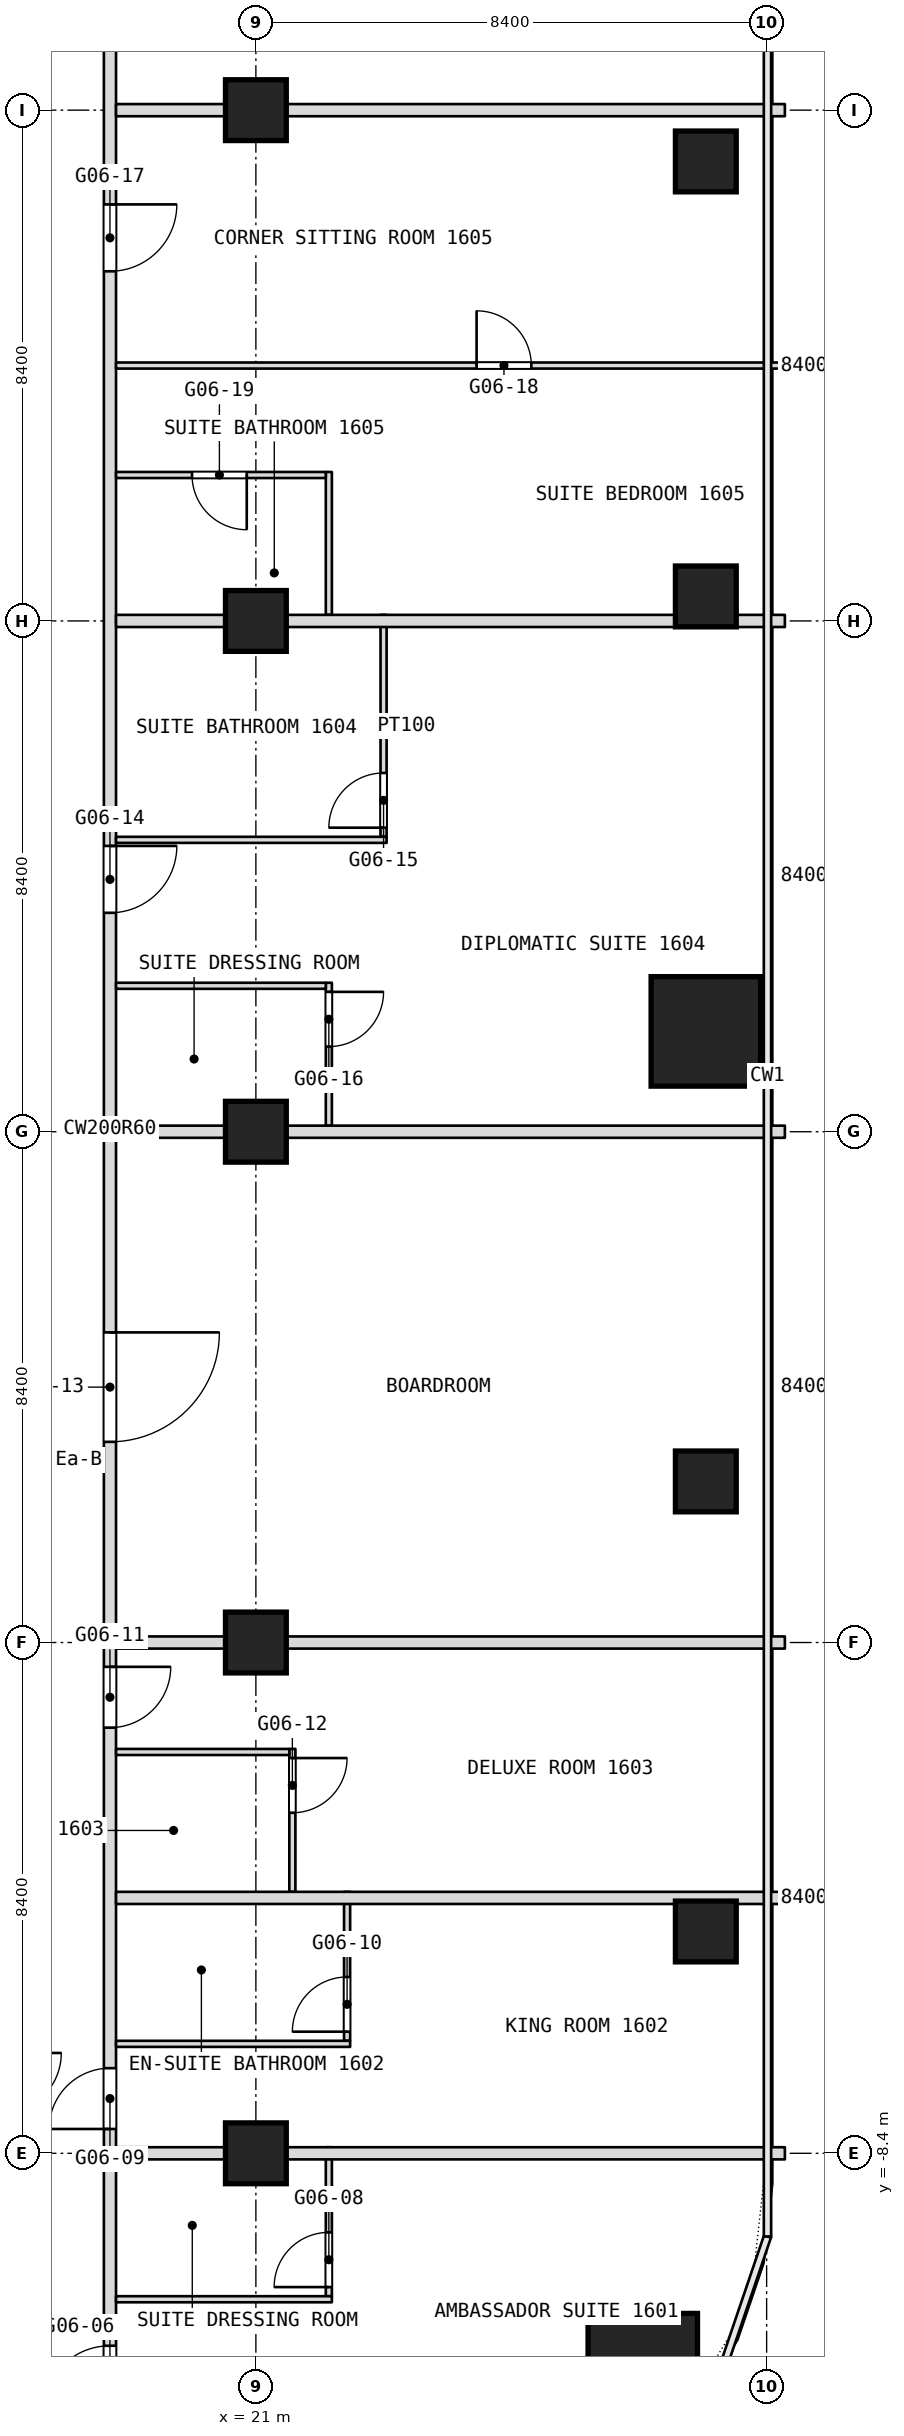
"""IFC4 building model, lengths in metres.
Left out: names, types, materials, properties, quantities, classifications, styles, units other than length and angle.
Written with IfcOpenShell. Run it as: python <this file> out.ifc"""

import sys

from ifc_helpers import new_model, si_unit, direction, frame, frame_2d, origin, origin_2d, place, context, subcontext, project, spatial, rectangle, extrude, element, fill, save


model = new_model("IFC4")
c1 = context("Model", 3, precision=1e-05, world=origin(), true_north=direction((0.0, 1.0)))
c2 = subcontext(c1, "Body", "Model", "MODEL_VIEW")
j1 = project(units=[si_unit("LENGTHUNIT", "METRE"), si_unit("PLANEANGLEUNIT", "RADIAN")], contexts=[c1])
p1 = place(None, origin())
s1 = spatial("IfcSite", under=j1, at=p1, CompositionType="ELEMENT")
p2 = place(p1, origin())
s2 = spatial("IfcBuilding", under=s1, at=p2, CompositionType="ELEMENT")
p3 = place(p2, frame((0.0, 0.0, 72.5)))
s3 = spatial("IfcBuildingStorey", under=s2, at=p3, CompositionType="ELEMENT", Elevation=72.5)
for number, where, z_axis, x_axis in (
    (1, (27.363, -11.933, 0.0), (0.0, 0.0, 1.0), (1.0, 0.0, 0.0)),
    (2, (28.4, 10.05, 0.0), (0.0, 0.0, 1.0), (1.0, 0.0, 0.0)),
):
    element("IfcColumn", number, at=place(p3, frame(where, z_axis=z_axis, x_axis=x_axis)), inside=s3, PredefinedType="COLUMN", context=c2, shape_type="SweptSolid", body=[
        extrude(rectangle(XDim=1.8, YDim=1.8, at=origin_2d()), origin(), (0.0, 0.0, 1.0), 3.6),
    ])
for number, where, z_axis, x_axis in (
    (3, (21.0, -8.4, 0.0), (0.0, 0.0, 1.0), (1.0, 0.0, 0.0)),
    (4, (21.0, 0.0, 0.0), (0.0, 0.0, 1.0), (1.0, 0.0, 0.0)),
    (5, (21.0, 8.4, 0.0), (0.0, 0.0, 1.0), (1.0, 0.0, 0.0)),
    (6, (21.0, 16.8, 0.0), (0.0, 0.0, 1.0), (1.0, 0.0, 0.0)),
    (7, (21.0, 25.2, 0.0), (0.0, 0.0, 1.0), (1.0, 0.0, 0.0)),
    (8, (28.4, 24.356, 0.0), (0.0, 0.0, 1.0), (1.0, 0.0, 0.0)),
    (9, (28.4, 17.203, 0.0), (0.0, 0.0, 1.0), (1.0, 0.0, 0.0)),
    (10, (28.4, 2.649, 0.0), (0.0, 0.0, 1.0), (1.0, 0.0, 0.0)),
    (11, (28.4, -4.752, 0.0), (0.0, 0.0, 1.0), (1.0, 0.0, 0.0)),
):
    element("IfcColumn", number, at=place(p3, frame(where, z_axis=z_axis, x_axis=x_axis)), inside=s3, PredefinedType="COLUMN", context=c2, shape_type="SweptSolid", body=[
        extrude(rectangle(XDim=1.0, YDim=1.0, at=origin_2d()), origin(), (0.0, 0.0, 1.0), 3.6),
    ])
p4 = place(p3, frame((23.1, 13.25, 0.0), z_axis=(0.0, 0.0, 1.0), x_axis=(0.0, 1.0, 0.0)))
e12 = element("IfcWall", 12, at=p4, inside=s3, PredefinedType="PARTITIONING", context=c2, shape_type="SweptSolid", body=[
    extrude(rectangle(XDim=3.65, YDim=0.1, at=frame_2d((1.825, 0.0))), origin(), (0.0, 0.0, 1.0), 3.34),
])
p5 = place(p4, frame((0.15, 0.0, 0.0)))
e13 = element("IfcOpeningElement", 13, at=p5, cuts=e12, PredefinedType="OPENING", context=c2, shape_type="SweptSolid", body=[
    extrude(rectangle(XDim=0.9, YDim=2.1, at=frame_2d((0.45, 1.05))), frame((0.0, 0.05, 0.0), z_axis=(0.0, -1.0, 0.0), x_axis=(1.0, 0.0, 0.0)), (0.0, 0.0, 1.0), 0.1),
])
p6 = place(p3, frame((22.5, -6.55, 0.0), z_axis=(0.0, 0.0, 1.0), x_axis=(0.0, 1.0, 0.0)))
e14 = element("IfcWall", 14, at=p6, inside=s3, PredefinedType="PARTITIONING", context=c2, shape_type="SweptSolid", body=[
    extrude(rectangle(XDim=2.45, YDim=0.1, at=frame_2d((1.225, 0.0))), origin(), (0.0, 0.0, 1.0), 3.34),
])
p7 = place(p6, frame((0.15, 0.0, 0.0)))
e15 = element("IfcOpeningElement", 15, at=p7, cuts=e14, PredefinedType="OPENING", context=c2, shape_type="SweptSolid", body=[
    extrude(rectangle(XDim=0.9, YDim=2.1, at=frame_2d((0.45, 1.05))), frame((0.0, 0.05, 0.0), z_axis=(0.0, -1.0, 0.0), x_axis=(1.0, 0.0, 0.0)), (0.0, 0.0, 1.0), 0.1),
])
p8 = place(p3, frame((22.2, -10.75, 0.0), z_axis=(0.0, 0.0, 1.0), x_axis=(0.0, 1.0, 0.0)))
e16 = element("IfcWall", 16, at=p8, inside=s3, PredefinedType="PARTITIONING", context=c2, shape_type="SweptSolid", body=[
    extrude(rectangle(XDim=2.45, YDim=0.1, at=frame_2d((1.225, 0.0))), origin(), (0.0, 0.0, 1.0), 3.34),
])
p9 = place(p8, frame((0.15, 0.0, 0.0)))
e17 = element("IfcOpeningElement", 17, at=p9, cuts=e16, PredefinedType="OPENING", context=c2, shape_type="SweptSolid", body=[
    extrude(rectangle(XDim=0.9, YDim=2.1, at=frame_2d((0.45, 1.05))), frame((0.0, 0.05, 0.0), z_axis=(0.0, -1.0, 0.0), x_axis=(1.0, 0.0, 0.0)), (0.0, 0.0, 1.0), 0.1),
])
p10 = place(p3, frame((22.2, 8.5, 0.0), z_axis=(0.0, 0.0, 1.0), x_axis=(0.0, 1.0, 0.0)))
e18 = element("IfcWall", 18, at=p10, inside=s3, PredefinedType="PARTITIONING", context=c2, shape_type="SweptSolid", body=[
    extrude(rectangle(XDim=2.35, YDim=0.1, at=frame_2d((1.175, 0.0))), origin(), (0.0, 0.0, 1.0), 3.34),
])
p11 = place(p10, frame((1.3, 0.0, 0.0)))
e19 = element("IfcOpeningElement", 19, at=p11, cuts=e18, PredefinedType="OPENING", context=c2, shape_type="SweptSolid", body=[
    extrude(rectangle(XDim=0.9, YDim=2.1, at=frame_2d((0.45, 1.05))), frame((0.0, 0.05, 0.0), z_axis=(0.0, -1.0, 0.0), x_axis=(1.0, 0.0, 0.0)), (0.0, 0.0, 1.0), 0.1),
])
p12 = place(p3, frame((22.2, 16.9, 0.0), z_axis=(0.0, 0.0, 1.0), x_axis=(0.0, 1.0, 0.0)))
e20 = element("IfcWall", 20, at=p12, inside=s3, PredefinedType="PARTITIONING", context=c2, shape_type="SweptSolid", body=[
    extrude(rectangle(XDim=2.35, YDim=0.1, at=frame_2d((1.175, 0.0))), origin(), (0.0, 0.0, 1.0), 3.34),
])
p13 = place(p3, frame((21.6, -4.1, 0.0), z_axis=(0.0, 0.0, 1.0), x_axis=(0.0, 1.0, 0.0)))
e21 = element("IfcWall", 21, at=p13, inside=s3, PredefinedType="PARTITIONING", context=c2, shape_type="SweptSolid", body=[
    extrude(rectangle(XDim=2.35, YDim=0.1, at=frame_2d((1.175, 0.0))), origin(), (0.0, 0.0, 1.0), 3.34),
])
p14 = place(p13, frame((1.3, 0.0, 0.0)))
e22 = element("IfcOpeningElement", 22, at=p14, cuts=e21, PredefinedType="OPENING", context=c2, shape_type="SweptSolid", body=[
    extrude(rectangle(XDim=0.9, YDim=2.1, at=frame_2d((0.45, 1.05))), frame((0.0, 0.05, 0.0), z_axis=(0.0, -1.0, 0.0), x_axis=(1.0, 0.0, 0.0)), (0.0, 0.0, 1.0), 0.1),
])
p15 = place(p3, frame((18.6, -16.665, 0.0), z_axis=(0.0, 0.0, 1.0), x_axis=(0.0, 1.0, 0.0)))
e23 = element("IfcWall", 23, at=p15, inside=s3, PredefinedType="PARTITIONING", context=c2, shape_type="SweptSolid", body=[
    extrude(rectangle(XDim=50.205, YDim=0.2, at=frame_2d((25.103, 0.0))), origin(), (0.0, 0.0, 1.0), 3.34),
])
p16 = place(p15, frame((4.0, 0.0, 0.0)))
e24 = element("IfcOpeningElement", 24, at=p16, cuts=e23, PredefinedType="OPENING", context=c2, shape_type="SweptSolid", body=[
    extrude(rectangle(XDim=1.1, YDim=2.1, at=frame_2d((0.55, 1.05))), frame((0.0, 0.1, 0.0), z_axis=(0.0, -1.0, 0.0), x_axis=(1.0, 0.0, 0.0)), (0.0, 0.0, 1.0), 0.2),
])
p17 = place(p15, frame((8.665, 0.0, 0.0)))
e25 = element("IfcOpeningElement", 25, at=p17, cuts=e23, PredefinedType="OPENING", context=c2, shape_type="SweptSolid", body=[
    extrude(rectangle(XDim=1.0, YDim=2.1, at=frame_2d((0.5, 1.05))), frame((0.0, 0.1, 0.0), z_axis=(0.0, -1.0, 0.0), x_axis=(1.0, 0.0, 0.0)), (0.0, 0.0, 1.0), 0.2),
])
p18 = place(p15, frame((15.265, 0.0, 0.0)))
e26 = element("IfcOpeningElement", 26, at=p18, cuts=e23, PredefinedType="OPENING", context=c2, shape_type="SweptSolid", body=[
    extrude(rectangle(XDim=1.0, YDim=2.1, at=frame_2d((0.5, 1.05))), frame((0.0, 0.1, 0.0), z_axis=(0.0, -1.0, 0.0), x_axis=(1.0, 0.0, 0.0)), (0.0, 0.0, 1.0), 0.2),
])
p19 = place(p15, frame((19.965, 0.0, 0.0)))
e27 = element("IfcOpeningElement", 27, at=p19, cuts=e23, PredefinedType="OPENING", context=c2, shape_type="SweptSolid", body=[
    extrude(rectangle(XDim=1.8, YDim=2.1, at=frame_2d((0.9, 1.05))), frame((0.0, 0.1, 0.0), z_axis=(0.0, -1.0, 0.0), x_axis=(1.0, 0.0, 0.0)), (0.0, 0.0, 1.0), 0.2),
])
p20 = place(p15, frame((28.665, 0.0, 0.0)))
e28 = element("IfcOpeningElement", 28, at=p20, cuts=e23, PredefinedType="OPENING", context=c2, shape_type="SweptSolid", body=[
    extrude(rectangle(XDim=1.1, YDim=2.1, at=frame_2d((0.55, 1.05))), frame((0.0, 0.1, 0.0), z_axis=(0.0, -1.0, 0.0), x_axis=(1.0, 0.0, 0.0)), (0.0, 0.0, 1.0), 0.2),
])
p21 = place(p15, frame((39.215, 0.0, 0.0)))
e29 = element("IfcOpeningElement", 29, at=p21, cuts=e23, PredefinedType="OPENING", context=c2, shape_type="SweptSolid", body=[
    extrude(rectangle(XDim=1.1, YDim=2.1, at=frame_2d((0.55, 1.05))), frame((0.0, 0.1, 0.0), z_axis=(0.0, -1.0, 0.0), x_axis=(1.0, 0.0, 0.0)), (0.0, 0.0, 1.0), 0.2),
])
p22 = place(p15, frame((45.165, 0.0, 0.0)))
e30 = element("IfcOpeningElement", 30, at=p22, cuts=e23, PredefinedType="OPENING", context=c2, shape_type="SweptSolid", body=[
    extrude(rectangle(XDim=1.8, YDim=2.1, at=frame_2d((0.9, 1.05))), frame((0.0, 0.1, 0.0), z_axis=(0.0, -1.0, 0.0), x_axis=(1.0, 0.0, 0.0)), (0.0, 0.0, 1.0), 0.2),
])
p23 = place(p3, frame((18.7, -10.8, 0.0), z_axis=(0.0, 0.0, 1.0), x_axis=(1.0, 0.0, 0.0)))
e31 = element("IfcWall", 31, at=p23, inside=s3, PredefinedType="PARTITIONING", context=c2, shape_type="SweptSolid", body=[
    extrude(rectangle(XDim=3.55, YDim=0.1, at=frame_2d((1.775, 0.0))), origin(), (0.0, 0.0, 1.0), 3.34),
])
p24 = place(p3, frame((18.7, -8.4, 0.0), z_axis=(0.0, 0.0, 1.0), x_axis=(1.0, 0.0, 0.0)))
e32 = element("IfcWall", 32, at=p24, inside=s3, PredefinedType="PARTITIONING", context=c2, shape_type="SweptSolid", body=[
    extrude(rectangle(XDim=11.0, YDim=0.2, at=frame_2d((5.5, 0.0))), origin(), (0.0, 0.0, 1.0), 2.84),
])
p25 = place(p3, frame((18.7, -6.6, 0.0), z_axis=(0.0, 0.0, 1.0), x_axis=(1.0, 0.0, 0.0)))
e33 = element("IfcWall", 33, at=p25, inside=s3, PredefinedType="PARTITIONING", context=c2, shape_type="SweptSolid", body=[
    extrude(rectangle(XDim=3.85, YDim=0.1, at=frame_2d((1.925, 0.0))), origin(), (0.0, 0.0, 1.0), 3.34),
])
p26 = place(p3, frame((18.7, -4.2, 0.0), z_axis=(0.0, 0.0, 1.0), x_axis=(1.0, 0.0, 0.0)))
e34 = element("IfcWall", 34, at=p26, inside=s3, PredefinedType="PARTITIONING", context=c2, shape_type="SweptSolid", body=[
    extrude(rectangle(XDim=11.0, YDim=0.2, at=frame_2d((5.5, 0.0))), origin(), (0.0, 0.0, 1.0), 3.34),
])
p27 = place(p3, frame((18.7, -1.8, 0.0), z_axis=(0.0, 0.0, 1.0), x_axis=(1.0, 0.0, 0.0)))
e35 = element("IfcWall", 35, at=p27, inside=s3, PredefinedType="PARTITIONING", context=c2, shape_type="SweptSolid", body=[
    extrude(rectangle(XDim=2.85, YDim=0.1, at=frame_2d((1.425, 0.0))), origin(), (0.0, 0.0, 1.0), 3.34),
])
for number, where, z_axis, x_axis in (
    (36, (18.7, 0.0, 0.0), (0.0, 0.0, 1.0), (1.0, 0.0, 0.0)),
    (37, (18.7, 8.4, 0.0), (0.0, 0.0, 1.0), (1.0, 0.0, 0.0)),
):
    element("IfcWall", number, at=place(p3, frame(where, z_axis=z_axis, x_axis=x_axis)), inside=s3, PredefinedType="PARTITIONING", context=c2, shape_type="SweptSolid", body=[
        extrude(rectangle(XDim=11.0, YDim=0.2, at=frame_2d((5.5, 0.0))), origin(), (0.0, 0.0, 1.0), 2.84),
    ])
p28 = place(p3, frame((18.7, 10.8, 0.0), z_axis=(0.0, 0.0, 1.0), x_axis=(1.0, 0.0, 0.0)))
e38 = element("IfcWall", 38, at=p28, inside=s3, PredefinedType="PARTITIONING", context=c2, shape_type="SweptSolid", body=[
    extrude(rectangle(XDim=3.45, YDim=0.1, at=frame_2d((1.725, 0.0))), origin(), (0.0, 0.0, 1.0), 3.34),
])
p29 = place(p3, frame((18.7, 13.2, 0.0), z_axis=(0.0, 0.0, 1.0), x_axis=(1.0, 0.0, 0.0)))
e39 = element("IfcWall", 39, at=p29, inside=s3, PredefinedType="PARTITIONING", context=c2, shape_type="SweptSolid", body=[
    extrude(rectangle(XDim=4.45, YDim=0.1, at=frame_2d((2.225, 0.0))), origin(), (0.0, 0.0, 1.0), 3.34),
])
p30 = place(p3, frame((18.7, 16.8, 0.0), z_axis=(0.0, 0.0, 1.0), x_axis=(1.0, 0.0, 0.0)))
e40 = element("IfcWall", 40, at=p30, inside=s3, PredefinedType="PARTITIONING", context=c2, shape_type="SweptSolid", body=[
    extrude(rectangle(XDim=11.0, YDim=0.2, at=frame_2d((5.5, 0.0))), origin(), (0.0, 0.0, 1.0), 2.84),
])
p31 = place(p3, frame((18.7, 19.2, 0.0), z_axis=(0.0, 0.0, 1.0), x_axis=(1.0, 0.0, 0.0)))
e41 = element("IfcWall", 41, at=p31, inside=s3, PredefinedType="PARTITIONING", context=c2, shape_type="SweptSolid", body=[
    extrude(rectangle(XDim=3.45, YDim=0.1, at=frame_2d((1.725, 0.0))), origin(), (0.0, 0.0, 1.0), 3.34),
])
p32 = place(p31, frame((1.25, 0.0, 0.0)))
e42 = element("IfcOpeningElement", 42, at=p32, cuts=e41, PredefinedType="OPENING", context=c2, shape_type="SweptSolid", body=[
    extrude(rectangle(XDim=0.9, YDim=2.1, at=frame_2d((0.45, 1.05))), frame((0.0, 0.05, 0.0), z_axis=(0.0, -1.0, 0.0), x_axis=(1.0, 0.0, 0.0)), (0.0, 0.0, 1.0), 0.1),
])
p33 = place(p3, frame((18.7, 21.0, 0.0), z_axis=(0.0, 0.0, 1.0), x_axis=(1.0, 0.0, 0.0)))
e43 = element("IfcWall", 43, at=p33, inside=s3, PredefinedType="PARTITIONING", context=c2, shape_type="SweptSolid", body=[
    extrude(rectangle(XDim=11.0, YDim=0.1, at=frame_2d((5.5, 0.0))), origin(), (0.0, 0.0, 1.0), 3.34),
])
p34 = place(p33, frame((5.93, 0.0, 0.0)))
e44 = element("IfcOpeningElement", 44, at=p34, cuts=e43, PredefinedType="OPENING", context=c2, shape_type="SweptSolid", body=[
    extrude(rectangle(XDim=0.9, YDim=2.1, at=frame_2d((0.45, 1.05))), frame((0.0, 0.05, 0.0), z_axis=(0.0, -1.0, 0.0), x_axis=(1.0, 0.0, 0.0)), (0.0, 0.0, 1.0), 0.1),
])
p35 = place(p3, frame((18.7, 25.2, 0.0), z_axis=(0.0, 0.0, 1.0), x_axis=(1.0, 0.0, 0.0)))
e45 = element("IfcWall", 45, at=p35, inside=s3, PredefinedType="PARTITIONING", context=c2, shape_type="SweptSolid", body=[
    extrude(rectangle(XDim=11.0, YDim=0.2, at=frame_2d((5.5, 0.0))), origin(), (0.0, 0.0, 1.0), 2.84),
])
p36 = place(p5, origin())
e46 = element("IfcDoor", 46, at=p36, inside=s3, OperationType="SINGLE_SWING_LEFT", PredefinedType="DOOR", context=c2, shape_type="SweptSolid", body=[
    extrude(rectangle(XDim=0.9, YDim=2.1, at=frame_2d((0.45, 1.05))), frame((0.0, 0.025, 0.0), z_axis=(0.0, -1.0, 0.0), x_axis=(1.0, 0.0, 0.0)), (0.0, 0.0, 1.0), 0.05),
])
fill(e13, e46)
p37 = place(p7, origin())
e47 = element("IfcDoor", 47, at=p37, inside=s3, OperationType="SINGLE_SWING_LEFT", PredefinedType="DOOR", context=c2, shape_type="SweptSolid", body=[
    extrude(rectangle(XDim=0.9, YDim=2.1, at=frame_2d((0.45, 1.05))), frame((0.0, 0.025, 0.0), z_axis=(0.0, -1.0, 0.0), x_axis=(1.0, 0.0, 0.0)), (0.0, 0.0, 1.0), 0.05),
])
fill(e15, e47)
p38 = place(p9, origin())
e48 = element("IfcDoor", 48, at=p38, inside=s3, OperationType="SINGLE_SWING_LEFT", PredefinedType="DOOR", context=c2, shape_type="SweptSolid", body=[
    extrude(rectangle(XDim=0.9, YDim=2.1, at=frame_2d((0.45, 1.05))), frame((0.0, 0.025, 0.0), z_axis=(0.0, -1.0, 0.0), x_axis=(1.0, 0.0, 0.0)), (0.0, 0.0, 1.0), 0.05),
])
fill(e17, e48)
p39 = place(p11, origin())
e49 = element("IfcDoor", 49, at=p39, inside=s3, OperationType="SINGLE_SWING_RIGHT", PredefinedType="DOOR", context=c2, shape_type="SweptSolid", body=[
    extrude(rectangle(XDim=0.9, YDim=2.1, at=frame_2d((0.45, 1.05))), frame((0.0, 0.025, 0.0), z_axis=(0.0, -1.0, 0.0), x_axis=(1.0, 0.0, 0.0)), (0.0, 0.0, 1.0), 0.05),
])
fill(e19, e49)
p40 = place(p14, origin())
e50 = element("IfcDoor", 50, at=p40, inside=s3, OperationType="SINGLE_SWING_RIGHT", PredefinedType="DOOR", context=c2, shape_type="SweptSolid", body=[
    extrude(rectangle(XDim=0.9, YDim=2.1, at=frame_2d((0.45, 1.05))), frame((0.0, 0.025, 0.0), z_axis=(0.0, -1.0, 0.0), x_axis=(1.0, 0.0, 0.0)), (0.0, 0.0, 1.0), 0.05),
])
fill(e22, e50)
p41 = place(p16, origin())
e51 = element("IfcDoor", 51, at=p41, inside=s3, OperationType="SINGLE_SWING_RIGHT", PredefinedType="DOOR", context=c2, shape_type="SweptSolid", body=[
    extrude(rectangle(XDim=1.1, YDim=2.1, at=frame_2d((0.55, 1.05))), frame((0.0, 0.025, 0.0), z_axis=(0.0, -1.0, 0.0), x_axis=(1.0, 0.0, 0.0)), (0.0, 0.0, 1.0), 0.05),
])
fill(e24, e51)
p42 = place(p17, origin())
e52 = element("IfcDoor", 52, at=p42, inside=s3, OperationType="SINGLE_SWING_LEFT", PredefinedType="DOOR", context=c2, shape_type="SweptSolid", body=[
    extrude(rectangle(XDim=1.0, YDim=2.1, at=frame_2d((0.5, 1.05))), frame((0.0, 0.025, 0.0), z_axis=(0.0, -1.0, 0.0), x_axis=(1.0, 0.0, 0.0)), (0.0, 0.0, 1.0), 0.05),
])
fill(e25, e52)
p43 = place(p18, origin())
e53 = element("IfcDoor", 53, at=p43, inside=s3, OperationType="SINGLE_SWING_LEFT", PredefinedType="DOOR", context=c2, shape_type="SweptSolid", body=[
    extrude(rectangle(XDim=1.0, YDim=2.1, at=frame_2d((0.5, 1.05))), frame((0.0, 0.025, 0.0), z_axis=(0.0, -1.0, 0.0), x_axis=(1.0, 0.0, 0.0)), (0.0, 0.0, 1.0), 0.05),
])
fill(e26, e53)
p44 = place(p19, origin())
e54 = element("IfcDoor", 54, at=p44, inside=s3, OperationType="DOUBLE_DOOR_SINGLE_SWING", PredefinedType="DOOR", context=c2, shape_type="SweptSolid", body=[
    extrude(rectangle(XDim=1.8, YDim=2.1, at=frame_2d((0.9, 1.05))), frame((0.0, 0.025, 0.0), z_axis=(0.0, -1.0, 0.0), x_axis=(1.0, 0.0, 0.0)), (0.0, 0.0, 1.0), 0.05),
])
fill(e27, e54)
p45 = place(p20, origin())
e55 = element("IfcDoor", 55, at=p45, inside=s3, OperationType="SINGLE_SWING_LEFT", PredefinedType="DOOR", context=c2, shape_type="SweptSolid", body=[
    extrude(rectangle(XDim=1.1, YDim=2.1, at=frame_2d((0.55, 1.05))), frame((0.0, 0.025, 0.0), z_axis=(0.0, -1.0, 0.0), x_axis=(1.0, 0.0, 0.0)), (0.0, 0.0, 1.0), 0.05),
])
fill(e28, e55)
p46 = place(p21, origin())
e56 = element("IfcDoor", 56, at=p46, inside=s3, OperationType="SINGLE_SWING_LEFT", PredefinedType="DOOR", context=c2, shape_type="SweptSolid", body=[
    extrude(rectangle(XDim=1.1, YDim=2.1, at=frame_2d((0.55, 1.05))), frame((0.0, 0.025, 0.0), z_axis=(0.0, -1.0, 0.0), x_axis=(1.0, 0.0, 0.0)), (0.0, 0.0, 1.0), 0.05),
])
fill(e29, e56)
p47 = place(p32, origin())
e57 = element("IfcDoor", 57, at=p47, inside=s3, OperationType="SINGLE_SWING_RIGHT", PredefinedType="DOOR", context=c2, shape_type="SweptSolid", body=[
    extrude(rectangle(XDim=0.9, YDim=2.1, at=frame_2d((0.45, 1.05))), frame((0.0, 0.025, 0.0), z_axis=(0.0, -1.0, 0.0), x_axis=(1.0, 0.0, 0.0)), (0.0, 0.0, 1.0), 0.05),
])
fill(e42, e57)
p48 = place(p34, origin())
e58 = element("IfcDoor", 58, at=p48, inside=s3, OperationType="SINGLE_SWING_RIGHT", PredefinedType="DOOR", context=c2, shape_type="SweptSolid", body=[
    extrude(rectangle(XDim=0.9, YDim=2.1, at=frame_2d((0.45, 1.05))), frame((0.0, 0.025, 0.0), z_axis=(0.0, -1.0, 0.0), x_axis=(1.0, 0.0, 0.0)), (0.0, 0.0, 1.0), 0.05),
])
fill(e44, e58)
save(model, sys.argv[1])
